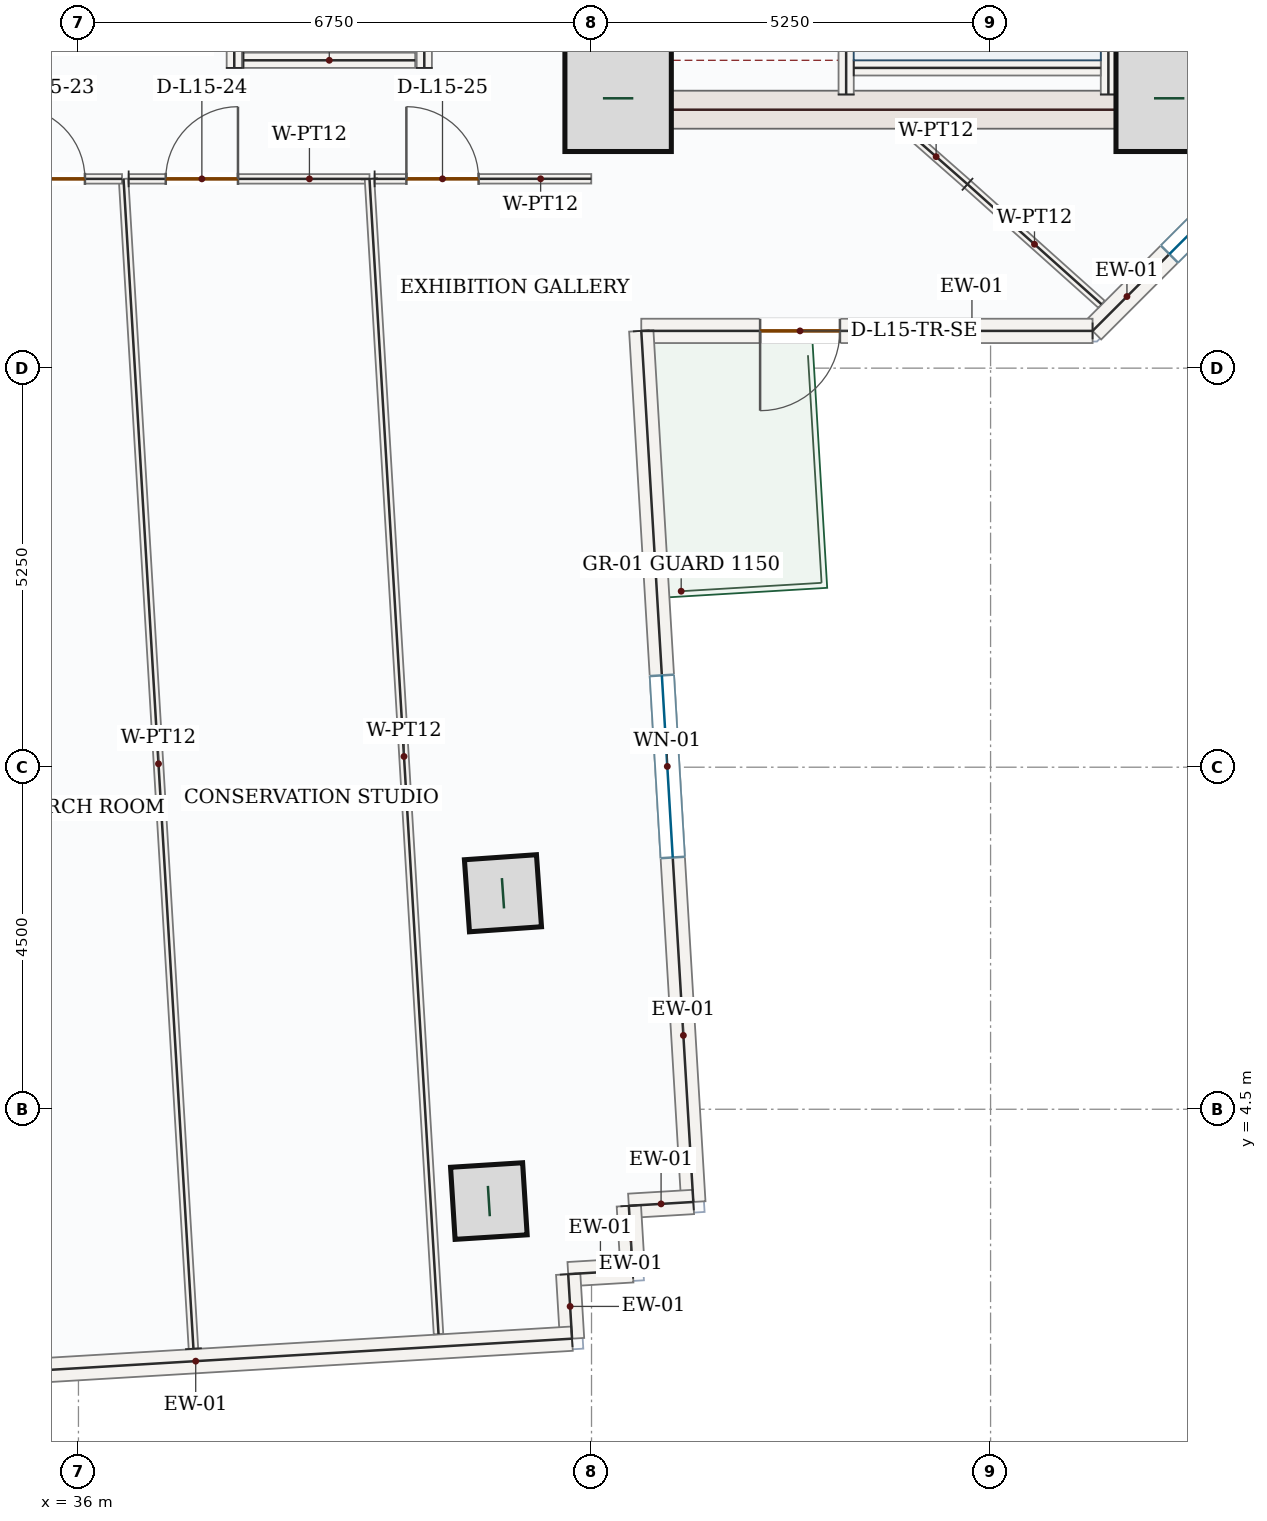
"""IFC4 building model, lengths in metres.
Left out: names, types, materials, properties, quantities, classifications, styles, units other than length and angle.
Written with IfcOpenShell. Run it as: python <this file> out.ifc"""

import sys

from ifc_helpers import new_model, si_unit, direction, frame, frame_2d, origin, origin_2d, place, context, subcontext, project, spatial, rectangle, hollow_rectangle, extrude, source, transform, mapped, element, fill, save


model = new_model("IFC4")
c1 = context("Model", 3, precision=1e-05, world=origin(), true_north=direction((0.0, 1.0)))
c2 = subcontext(c1, "Body", "Model", "MODEL_VIEW")
j1 = project(units=[si_unit("LENGTHUNIT", "METRE"), si_unit("PLANEANGLEUNIT", "RADIAN")], contexts=[c1])
p1 = place(None, origin())
s1 = spatial("IfcSite", under=j1, at=p1, CompositionType="ELEMENT")
p2 = place(p1, origin())
s2 = spatial("IfcBuilding", under=s1, at=p2, CompositionType="ELEMENT")
p3 = place(p2, frame((0.0, 0.0, 71.1)))
s3 = spatial("IfcBuildingStorey", under=s2, at=p3, CompositionType="ELEMENT", Elevation=71.1)
p4 = place(p3, frame((43.0, 17.4, 0.0), z_axis=(0.0, 0.0, 1.0), x_axis=(0.0, 1.0, 0.0)))
e1 = element("IfcWall", 1, at=p4, inside=s3, PredefinedType="SHEAR", context=c2, shape_type="SweptSolid", body=[
    extrude(rectangle(XDim=8.55, YDim=0.5, at=frame_2d((4.275, 0.0))), origin(), (0.0, 0.0, 1.0), 3.95),
])
p5 = place(p4, frame((6.65, 0.0, 0.0)))
e2 = element("IfcOpeningElement", 2, at=p5, cuts=e1, PredefinedType="OPENING", context=c2, shape_type="SweptSolid", body=[
    extrude(rectangle(XDim=1.1, YDim=2.2, at=frame_2d((0.55, 1.1))), frame((0.0, 0.26, 0.0), z_axis=(0.0, -1.0, 0.0), x_axis=(1.0, 0.0, 0.0)), (0.0, 0.0, 1.0), 0.52),
])
p6 = place(p4, frame((1.75, 0.0, 0.0)))
e3 = element("IfcOpeningElement", 3, at=p6, cuts=e1, PredefinedType="OPENING", context=c2, shape_type="SweptSolid", body=[
    extrude(rectangle(XDim=1.3, YDim=2.2, at=frame_2d((0.65, 1.1))), frame((0.0, 0.26, 0.0), z_axis=(0.0, -1.0, 0.0), x_axis=(1.0, 0.0, 0.0)), (0.0, 0.0, 1.0), 0.52),
])
p7 = place(p4, frame((4.55, 0.0, 0.0)))
e4 = element("IfcOpeningElement", 4, at=p7, cuts=e1, PredefinedType="OPENING", context=c2, shape_type="SweptSolid", body=[
    extrude(rectangle(XDim=0.88, YDim=2.1, at=frame_2d((0.44, 1.05))), frame((0.0, 0.26, 0.0), z_axis=(0.0, -1.0, 0.0), x_axis=(1.0, 0.0, 0.0)), (0.0, 0.0, 1.0), 0.52),
])
m1 = source(origin(), c2, "Body", "SweptSolid", [
    extrude(rectangle(XDim=8.55, YDim=0.5, at=frame_2d((4.275, 0.0))), origin(), (0.0, 0.0, 1.0), 3.95),
])
p8 = place(p3, frame((50.5, 17.4, 0.0), z_axis=(0.0, 0.0, 1.0), x_axis=(0.0, 1.0, 0.0)))
e5 = element("IfcWall", 5, at=p8, inside=s3, PredefinedType="SHEAR", context=c2, shape_type="MappedRepresentation", body=[
    mapped(m1, transform((0.0, 0.0, 0.0), x_axis=(1.0, 0.0, 0.0), y_axis=(0.0, 1.0, 0.0), z_axis=(0.0, 0.0, 1.0), scale=1.0)),
])
m2 = source(origin(), c2, "Body", "SweptSolid", [
    extrude(rectangle(XDim=7.0, YDim=0.5, at=frame_2d((3.5, 0.0))), origin(), (0.0, 0.0, 1.0), 3.95),
])
p9 = place(p3, frame((43.25, 17.65, 0.0), z_axis=(0.0, 0.0, 1.0), x_axis=(1.0, 0.0, 0.0)))
e6 = element("IfcWall", 6, at=p9, inside=s3, PredefinedType="SHEAR", context=c2, shape_type="MappedRepresentation", body=[
    mapped(m2, transform((0.0, 0.0, 0.0), x_axis=(1.0, 0.0, 0.0), y_axis=(0.0, 1.0, 0.0), z_axis=(0.0, 0.0, 1.0), scale=1.0)),
])
m3 = source(origin(), c2, "Body", "SweptSolid", [
    extrude(rectangle(XDim=1.4, YDim=1.4, at=origin_2d()), origin(), (0.0, 0.0, 1.0), 4.2),
])
for number, where, z_axis, x_axis in (
    (7, (43.1, 17.8, 0.0), (0.0, 0.0, 1.0), (1.0, 0.0, 0.0)),
    (8, (50.35, 17.8, 0.0), (0.0, 0.0, 1.0), (1.0, 0.0, 0.0)),
):
    element("IfcColumn", number, at=place(p3, frame(where, z_axis=z_axis, x_axis=x_axis)), inside=s3, PredefinedType="COLUMN", context=c2, shape_type="MappedRepresentation", body=[
        mapped(m3, transform((0.0, 0.0, 0.0), x_axis=(1.0, 0.0, 0.0), y_axis=(0.0, 1.0, 0.0), z_axis=(0.0, 0.0, 1.0), scale=1.0)),
    ])
m4 = source(origin(), c2, "Body", "SweptSolid", [
    extrude(hollow_rectangle(XDim=0.95, YDim=0.95, WallThickness=0.05, at=origin_2d()), origin(), (0.0, 0.0, 1.0), 4.2),
])
for number, where, z_axis, x_axis in (
    (9, (41.585, 7.342, 0.0), (0.0, 0.0, 1.0), (-0.07, 0.998, 0.0)),
    (10, (41.399, 3.292, 0.0), (0.0, 0.0, 1.0), (-0.063, 0.998, 0.0)),
):
    element("IfcColumn", number, at=place(p3, frame(where, z_axis=z_axis, x_axis=x_axis)), inside=s3, PredefinedType="COLUMN", context=c2, shape_type="MappedRepresentation", body=[
        mapped(m4, transform((0.0, 0.0, 0.0), x_axis=(1.0, 0.0, 0.0), y_axis=(0.0, 1.0, 0.0), z_axis=(0.0, 0.0, 1.0), scale=1.0)),
    ])
p10 = place(p3, frame((53.06, 18.458, 0.0), z_axis=(0.0, 0.0, 1.0), x_axis=(-0.707106781187, -0.707106781187, 0.0)))
e11 = element("IfcWall", 11, at=p10, inside=s3, PredefinedType="SOLIDWALL", context=c2, shape_type="SweptSolid", body=[
    extrude(rectangle(XDim=5.258, YDim=0.32, at=frame_2d((2.629, 0.0))), origin(), (0.0, 0.0, 1.0), 3.95),
])
p11 = place(p10, frame((1.429, 0.0, 0.85)))
e12 = element("IfcOpeningElement", 12, at=p11, cuts=e11, PredefinedType="OPENING", context=c2, shape_type="SweptSolid", body=[
    extrude(rectangle(XDim=2.4, YDim=1.8, at=frame_2d((1.2, 0.9))), frame((0.0, 0.17, 0.0), z_axis=(0.0, -1.0, 0.0), x_axis=(1.0, 0.0, 0.0)), (0.0, 0.0, 1.0), 0.34),
])
p12 = place(p3, frame((49.342, 14.74, 0.0), z_axis=(0.0, 0.0, 1.0), x_axis=(-1.0, 0.0, 0.0)))
e13 = element("IfcWall", 13, at=p12, inside=s3, PredefinedType="SOLIDWALL", context=c2, shape_type="SweptSolid", body=[
    extrude(rectangle(XDim=5.938, YDim=0.32, at=frame_2d((2.969, 0.0))), origin(), (0.0, 0.0, 1.0), 3.95),
])
p13 = place(p12, frame((3.324, 0.0, 0.0)))
e14 = element("IfcOpeningElement", 14, at=p13, cuts=e13, PredefinedType="OPENING", context=c2, shape_type="SweptSolid", body=[
    extrude(rectangle(XDim=1.05, YDim=2.15, at=frame_2d((0.525, 1.075))), frame((0.0, 0.17, 0.0), z_axis=(0.0, -1.0, 0.0), x_axis=(1.0, 0.0, 0.0)), (0.0, 0.0, 1.0), 0.34),
])
p14 = place(p3, frame((43.405, 14.74, 0.0), z_axis=(0.0, 0.0, 1.0), x_axis=(0.059651994121, -0.998219234235, 0.0)))
e15 = element("IfcWall", 15, at=p14, inside=s3, PredefinedType="SOLIDWALL", context=c2, shape_type="SweptSolid", body=[
    extrude(rectangle(XDim=11.48, YDim=0.32, at=frame_2d((5.74, 0.0))), origin(), (0.0, 0.0, 1.0), 3.95),
])
p15 = place(p14, frame((4.54, 0.0, 0.85)))
e16 = element("IfcOpeningElement", 16, at=p15, cuts=e15, PredefinedType="OPENING", context=c2, shape_type="SweptSolid", body=[
    extrude(rectangle(XDim=2.4, YDim=1.8, at=frame_2d((1.2, 0.9))), frame((0.0, 0.17, 0.0), z_axis=(0.0, -1.0, 0.0), x_axis=(1.0, 0.0, 0.0)), (0.0, 0.0, 1.0), 0.34),
])
m5 = source(origin(), c2, "Body", "SweptSolid", [
    extrude(rectangle(XDim=0.85, YDim=0.32, at=frame_2d((0.425, 0.0))), origin(), (0.0, 0.0, 1.0), 3.95),
])
for number, where, z_axis, x_axis in (
    (17, (44.089, 3.28, 0.0), (0.0, 0.0, 1.0), (-0.998, -0.06, 0.0)),
    (18, (43.241, 3.229, 0.0), (0.0, 0.0, 1.0), (0.059, -0.998, 0.0)),
    (19, (43.292, 2.381, 0.0), (0.0, 0.0, 1.0), (-0.998, -0.06, 0.0)),
    (20, (42.443, 2.33, 0.0), (0.0, 0.0, 1.0), (0.06, -0.998, 0.0)),
):
    element("IfcWall", number, at=place(p3, frame(where, z_axis=z_axis, x_axis=x_axis)), inside=s3, PredefinedType="SOLIDWALL", context=c2, shape_type="MappedRepresentation", body=[
        mapped(m5, transform((0.0, 0.0, 0.0), x_axis=(1.0, 0.0, 0.0), y_axis=(0.0, 1.0, 0.0), z_axis=(0.0, 0.0, 1.0), scale=1.0)),
    ])
m6 = source(origin(), c2, "Body", "SweptSolid", [
    extrude(rectangle(XDim=9.92, YDim=0.32, at=frame_2d((4.96, 0.0))), origin(), (0.0, 0.0, 1.0), 3.95),
])
p16 = place(p3, frame((42.494, 1.482, 0.0), z_axis=(0.0, 0.0, 1.0), x_axis=(-0.998218942745, -0.059656871726, 0.0)))
e21 = element("IfcWall", 21, at=p16, inside=s3, PredefinedType="SOLIDWALL", context=c2, shape_type="MappedRepresentation", body=[
    mapped(m6, transform((0.0, 0.0, 0.0), x_axis=(1.0, 0.0, 0.0), y_axis=(0.0, 1.0, 0.0), z_axis=(0.0, 0.0, 1.0), scale=1.0)),
])
m7 = source(origin(), c2, "Body", "SweptSolid", [
    extrude(rectangle(XDim=7.87, YDim=0.2, at=frame_2d((3.935, 0.0))), origin(), (0.0, 0.0, 1.0), 3.95),
])
p17 = place(p3, frame((49.55, 17.85, 0.0), z_axis=(0.0, 0.0, 1.0), x_axis=(0.0, 1.0, 0.0)))
e22 = element("IfcWall", 22, at=p17, inside=s3, PredefinedType="SOLIDWALL", context=c2, shape_type="MappedRepresentation", body=[
    mapped(m7, transform((0.0, 0.0, 0.0), x_axis=(1.0, 0.0, 0.0), y_axis=(0.0, 1.0, 0.0), z_axis=(0.0, 0.0, 1.0), scale=1.0)),
])
p18 = place(p3, frame((46.1, 17.85, 0.0), z_axis=(0.0, 0.0, 1.0), x_axis=(0.0, 1.0, 0.0)))
e23 = element("IfcWall", 23, at=p18, inside=s3, PredefinedType="SOLIDWALL", context=c2, shape_type="SweptSolid", body=[
    extrude(rectangle(XDim=8.0, YDim=0.2, at=frame_2d((4.0, 0.0))), origin(), (0.0, 0.0, 1.0), 3.95),
])
p19 = place(p18, frame((6.3, 0.0, 0.0)))
e24 = element("IfcOpeningElement", 24, at=p19, cuts=e23, PredefinedType="OPENING", context=c2, shape_type="SweptSolid", body=[
    extrude(rectangle(XDim=1.05, YDim=2.15, at=frame_2d((0.525, 1.075))), frame((0.0, 0.11, 0.0), z_axis=(0.0, -1.0, 0.0), x_axis=(1.0, 0.0, 0.0)), (0.0, 0.0, 1.0), 0.22),
])
m8 = source(origin(), c2, "Body", "SweptSolid", [
    extrude(rectangle(XDim=3.25, YDim=0.2, at=frame_2d((1.625, 0.0))), origin(), (0.0, 0.0, 1.0), 3.95),
])
p20 = place(p3, frame((46.2, 18.2, 0.0), z_axis=(0.0, 0.0, 1.0), x_axis=(1.0, 0.0, 0.0)))
e25 = element("IfcWall", 25, at=p20, inside=s3, PredefinedType="SOLIDWALL", context=c2, shape_type="MappedRepresentation", body=[
    mapped(m8, transform((0.0, 0.0, 0.0), x_axis=(1.0, 0.0, 0.0), y_axis=(0.0, 1.0, 0.0), z_axis=(0.0, 0.0, 1.0), scale=1.0)),
])
m9 = source(origin(), c2, "Body", "SweptSolid", [
    extrude(rectangle(XDim=2.35, YDim=0.2, at=frame_2d((1.175, 0.0))), origin(), (0.0, 0.0, 1.0), 3.95),
])
for number, where, z_axis, x_axis in (
    (26, (38.05, 18.2, 0.0), (0.0, 0.0, 1.0), (0.0, 1.0, 0.0)),
    (27, (40.55, 18.2, 0.0), (0.0, 0.0, 1.0), (0.0, 1.0, 0.0)),
):
    element("IfcWall", number, at=place(p3, frame(where, z_axis=z_axis, x_axis=x_axis)), inside=s3, PredefinedType="SOLIDWALL", context=c2, shape_type="MappedRepresentation", body=[
        mapped(m9, transform((0.0, 0.0, 0.0), x_axis=(1.0, 0.0, 0.0), y_axis=(0.0, 1.0, 0.0), z_axis=(0.0, 0.0, 1.0), scale=1.0)),
    ])
m10 = source(origin(), c2, "Body", "SweptSolid", [
    extrude(rectangle(XDim=2.26, YDim=0.2, at=frame_2d((1.13, 0.0))), origin(), (0.0, 0.0, 1.0), 3.95),
])
p21 = place(p3, frame((38.17, 18.3, 0.0), z_axis=(0.0, 0.0, 1.0), x_axis=(1.0, 0.0, 0.0)))
e28 = element("IfcWall", 28, at=p21, inside=s3, PredefinedType="SOLIDWALL", context=c2, shape_type="MappedRepresentation", body=[
    mapped(m10, transform((0.0, 0.0, 0.0), x_axis=(1.0, 0.0, 0.0), y_axis=(0.0, 1.0, 0.0), z_axis=(0.0, 0.0, 1.0), scale=1.0)),
])
m11 = source(origin(), c2, "Body", "SweptSolid", [
    extrude(rectangle(XDim=15.418, YDim=0.125, at=frame_2d((7.709, 0.0))), origin(), (0.0, 0.0, 1.0), 3.95),
])
p22 = place(p3, frame((37.513, 1.35, 0.0), z_axis=(0.0, 0.0, 1.0), x_axis=(-0.059666030768, 0.998218395329, 0.0)))
e29 = element("IfcWall", 29, at=p22, inside=s3, PredefinedType="PARTITIONING", context=c2, shape_type="MappedRepresentation", body=[
    mapped(m11, transform((0.0, 0.0, 0.0), x_axis=(1.0, 0.0, 0.0), y_axis=(0.0, 1.0, 0.0), z_axis=(0.0, 0.0, 1.0), scale=1.0)),
])
p23 = place(p3, frame((36.661, 16.74, 0.0), z_axis=(0.0, 0.0, 1.0), x_axis=(1.0, 0.0, 0.0)))
e30 = element("IfcWall", 30, at=p23, inside=s3, PredefinedType="PARTITIONING", context=c2, shape_type="SweptSolid", body=[
    extrude(rectangle(XDim=3.168, YDim=0.125, at=frame_2d((1.584, 0.0))), origin(), (0.0, 0.0, 1.0), 3.95),
])
p24 = place(p23, frame((0.488, 0.0, 0.0)))
e31 = element("IfcOpeningElement", 31, at=p24, cuts=e30, PredefinedType="OPENING", context=c2, shape_type="SweptSolid", body=[
    extrude(rectangle(XDim=0.95, YDim=2.15, at=frame_2d((0.475, 1.075))), frame((0.0, 0.073, 0.0), z_axis=(0.0, -1.0, 0.0), x_axis=(1.0, 0.0, 0.0)), (0.0, 0.0, 1.0), 0.145),
])
m12 = source(origin(), c2, "Body", "SweptSolid", [
    extrude(rectangle(XDim=15.225, YDim=0.125, at=frame_2d((7.612, 0.0))), origin(), (0.0, 0.0, 1.0), 3.95),
])
p25 = place(p3, frame((39.829, 16.74, 0.0), z_axis=(0.0, 0.0, 1.0), x_axis=(0.059652617074, -0.998219197008, 0.0)))
e32 = element("IfcWall", 32, at=p25, inside=s3, PredefinedType="PARTITIONING", context=c2, shape_type="MappedRepresentation", body=[
    mapped(m12, transform((0.0, 0.0, 0.0), x_axis=(1.0, 0.0, 0.0), y_axis=(0.0, 1.0, 0.0), z_axis=(0.0, 0.0, 1.0), scale=1.0)),
])
p26 = place(p3, frame((33.405, 16.74, 0.0), z_axis=(0.0, 0.0, 1.0), x_axis=(1.0, 0.0, 0.0)))
e33 = element("IfcWall", 33, at=p26, inside=s3, PredefinedType="PARTITIONING", context=c2, shape_type="SweptSolid", body=[
    extrude(rectangle(XDim=3.168, YDim=0.125, at=frame_2d((1.584, 0.0))), origin(), (0.0, 0.0, 1.0), 3.95),
])
p27 = place(p26, frame((1.73, 0.0, 0.0)))
e34 = element("IfcOpeningElement", 34, at=p27, cuts=e33, PredefinedType="OPENING", context=c2, shape_type="SweptSolid", body=[
    extrude(rectangle(XDim=0.95, YDim=2.15, at=frame_2d((0.475, 1.075))), frame((0.0, 0.073, 0.0), z_axis=(0.0, -1.0, 0.0), x_axis=(1.0, 0.0, 0.0)), (0.0, 0.0, 1.0), 0.145),
])
p28 = place(p3, frame((39.896, 16.74, 0.0), z_axis=(0.0, 0.0, 1.0), x_axis=(0.999999908279, 0.000428302171, 0.0)))
e35 = element("IfcWall", 35, at=p28, inside=s3, PredefinedType="PARTITIONING", context=c2, shape_type="SweptSolid", body=[
    extrude(rectangle(XDim=2.85, YDim=0.125, at=frame_2d((1.425, 0.0))), origin(), (0.0, 0.0, 1.0), 3.95),
])
p29 = place(p28, frame((0.418, 0.0, 0.0)))
e36 = element("IfcOpeningElement", 36, at=p29, cuts=e35, PredefinedType="OPENING", context=c2, shape_type="SweptSolid", body=[
    extrude(rectangle(XDim=0.95, YDim=2.15, at=frame_2d((0.475, 1.075))), frame((0.0, 0.073, 0.0), z_axis=(0.0, -1.0, 0.0), x_axis=(1.0, 0.0, 0.0)), (0.0, 0.0, 1.0), 0.145),
])
m13 = source(origin(), c2, "Body", "SweptSolid", [
    extrude(rectangle(XDim=1.099, YDim=0.125, at=frame_2d((0.549, 0.0))), origin(), (0.0, 0.0, 1.0), 3.95),
])
p30 = place(p3, frame((46.871, 17.395, 0.0), z_axis=(0.0, 0.0, 1.0), x_axis=(0.750977912422, -0.660327324177, 0.0)))
e37 = element("IfcWall", 37, at=p30, inside=s3, PredefinedType="PARTITIONING", context=c2, shape_type="MappedRepresentation", body=[
    mapped(m13, transform((0.0, 0.0, 0.0), x_axis=(1.0, 0.0, 0.0), y_axis=(0.0, 1.0, 0.0), z_axis=(0.0, 0.0, 1.0), scale=1.0)),
])
m14 = source(origin(), c2, "Body", "SweptSolid", [
    extrude(rectangle(XDim=2.367, YDim=0.125, at=frame_2d((1.183, 0.0))), origin(), (0.0, 0.0, 1.0), 3.95),
])
p31 = place(p3, frame((47.696, 16.669, 0.0), z_axis=(0.0, 0.0, 1.0), x_axis=(0.744928255706, -0.667144582419, 0.0)))
e38 = element("IfcWall", 38, at=p31, inside=s3, PredefinedType="PARTITIONING", context=c2, shape_type="MappedRepresentation", body=[
    mapped(m14, transform((0.0, 0.0, 0.0), x_axis=(1.0, 0.0, 0.0), y_axis=(0.0, 1.0, 0.0), z_axis=(0.0, 0.0, 1.0), scale=1.0)),
])
m15 = source(origin(), c2, "Body", "SweptSolid", [
    extrude(rectangle(XDim=2.4, YDim=1.8, at=frame_2d((1.2, 0.9))), frame((0.0, 0.03, 0.0), z_axis=(0.0, -1.0, 0.0), x_axis=(1.0, 0.0, 0.0)), (0.0, 0.0, 1.0), 0.06),
])
p32 = place(p11, origin())
e39 = element("IfcWindow", 39, at=p32, inside=s3, PartitioningType="DOUBLE_PANEL_VERTICAL", PredefinedType="WINDOW", context=c2, shape_type="MappedRepresentation", body=[
    mapped(m15, transform((0.0, 0.0, 0.0), x_axis=(1.0, 0.0, 0.0), y_axis=(0.0, 1.0, 0.0), z_axis=(0.0, 0.0, 1.0), scale=1.0)),
])
fill(e12, e39)
m16 = source(origin(), c2, "Body", "SweptSolid", [
    extrude(rectangle(XDim=1.05, YDim=2.15, at=frame_2d((0.525, 1.075))), frame((0.0, 0.025, 0.0), z_axis=(0.0, -1.0, 0.0), x_axis=(1.0, 0.0, 0.0)), (0.0, 0.0, 1.0), 0.05),
])
p33 = place(p13, origin())
e40 = element("IfcDoor", 40, at=p33, inside=s3, OperationType="SINGLE_SWING_RIGHT", PredefinedType="DOOR", context=c2, shape_type="MappedRepresentation", body=[
    mapped(m16, transform((0.0, 0.0, 0.0), x_axis=(1.0, 0.0, 0.0), y_axis=(0.0, 1.0, 0.0), z_axis=(0.0, 0.0, 1.0), scale=1.0)),
])
fill(e14, e40)
p34 = place(p15, origin())
e41 = element("IfcWindow", 41, at=p34, inside=s3, PartitioningType="DOUBLE_PANEL_VERTICAL", PredefinedType="WINDOW", context=c2, shape_type="MappedRepresentation", body=[
    mapped(m15, transform((0.0, 0.0, 0.0), x_axis=(1.0, 0.0, 0.0), y_axis=(0.0, 1.0, 0.0), z_axis=(0.0, 0.0, 1.0), scale=1.0)),
])
fill(e16, e41)
m17 = source(origin(), c2, "Body", "SweptSolid", [
    extrude(rectangle(XDim=0.95, YDim=2.15, at=frame_2d((0.475, 1.075))), frame((0.0, 0.025, 0.0), z_axis=(0.0, -1.0, 0.0), x_axis=(1.0, 0.0, 0.0)), (0.0, 0.0, 1.0), 0.05),
])
p35 = place(p27, origin())
e42 = element("IfcDoor", 42, at=p35, inside=s3, OperationType="SINGLE_SWING_LEFT", PredefinedType="DOOR", context=c2, shape_type="MappedRepresentation", body=[
    mapped(m17, transform((0.0, 0.0, 0.0), x_axis=(1.0, 0.0, 0.0), y_axis=(0.0, 1.0, 0.0), z_axis=(0.0, 0.0, 1.0), scale=1.0)),
])
fill(e34, e42)
p36 = place(p24, origin())
e43 = element("IfcDoor", 43, at=p36, inside=s3, OperationType="SINGLE_SWING_RIGHT", PredefinedType="DOOR", context=c2, shape_type="MappedRepresentation", body=[
    mapped(m17, transform((0.0, 0.0, 0.0), x_axis=(1.0, 0.0, 0.0), y_axis=(0.0, 1.0, 0.0), z_axis=(0.0, 0.0, 1.0), scale=1.0)),
])
fill(e31, e43)
p37 = place(p29, origin())
e44 = element("IfcDoor", 44, at=p37, inside=s3, OperationType="SINGLE_SWING_LEFT", PredefinedType="DOOR", context=c2, shape_type="MappedRepresentation", body=[
    mapped(m17, transform((0.0, 0.0, 0.0), x_axis=(1.0, 0.0, 0.0), y_axis=(0.0, 1.0, 0.0), z_axis=(0.0, 0.0, 1.0), scale=1.0)),
])
fill(e36, e44)
save(model, sys.argv[1])
